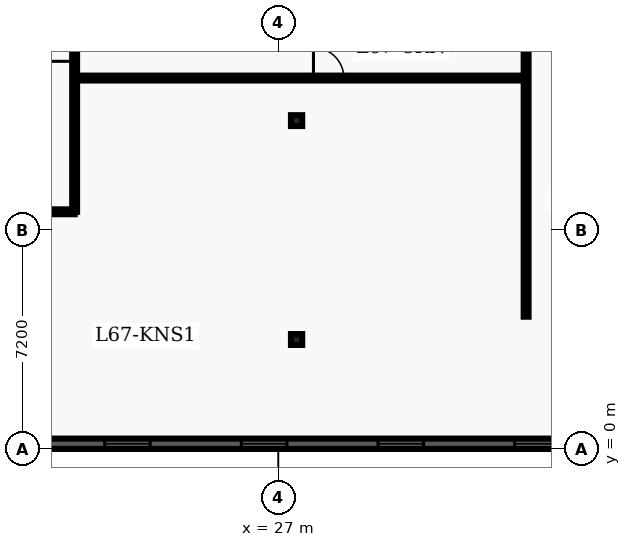
"""IFC4 building model, lengths in metres.
Left out: names, types, materials, properties, quantities, classifications, styles, units other than length and angle.
Written with IfcOpenShell. Run it as: python <this file> out.ifc"""

import sys

from ifc_helpers import new_model, entity, si_unit, converted_unit, direction, frame, origin_with_axes, origin_2d_with_axis, place, context, subcontext, project, spatial, polyline, rectangle, i_section, outline, extrude, element, fill, save


model = new_model("IFC4")
c1 = context("Model", 3, precision=1e-05, world=origin_with_axes(), true_north=direction((0.0, 1.0)))
c2 = subcontext(c1, "Body", "Model", "MODEL_VIEW")
j1 = project(units=[si_unit("LENGTHUNIT", "METRE"), converted_unit("PLANEANGLEUNIT", "DEGREE", entity("IfcPlaneAngleMeasure", 0.017), si_unit("PLANEANGLEUNIT", "RADIAN"), dimensions=[0, 0, 0, 0, 0, 0, 0])], contexts=[c1])
p1 = place(None, origin_with_axes())
s1 = spatial("IfcSite", under=j1, at=p1, CompositionType="ELEMENT")
p2 = place(p1, origin_with_axes())
s2 = spatial("IfcBuilding", under=s1, at=p2, CompositionType="ELEMENT")
p3 = place(p2, frame((0.0, 0.0, 272.4), z_axis=(0.0, 0.0, 1.0), x_axis=(1.0, 0.0, 0.0)))
s3 = spatial("IfcBuildingStorey", under=s2, at=p3, CompositionType="ELEMENT", Elevation=272.4)
for number, where, z_axis, x_axis in (
    (1, (27.6, 3.6, 0.0), (0.0, 0.0, 1.0), (1.0, 0.0, 0.0)),
    (2, (27.6, 10.8, 0.0), (0.0, 0.0, 1.0), (1.0, 0.0, 0.0)),
):
    element("IfcColumn", number, at=place(p3, frame(where, z_axis=z_axis, x_axis=x_axis)), inside=s3, PredefinedType="COLUMN", context=c2, shape_type="SweptSolid", body=[
        extrude(i_section(OverallWidth=0.369, OverallDepth=0.356, WebThickness=0.011, FlangeThickness=0.018, FilletRadius=0.018, at=origin_2d_with_axis()), origin_with_axes(), (0.0, 0.0, 1.0), 3.9),
    ])
p4 = place(p3, frame((8.135, 7.8, 0.0), z_axis=(0.0, 0.0, 1.0), x_axis=(1.0, 0.0, 0.0)))
e3 = element("IfcWall", 3, at=p4, inside=s3, PredefinedType="PARTITIONING", context=c2, shape_type="SweptSolid", body=[
    extrude(outline(polyline([(0.0, -0.08), (12.165, -0.08), (12.165, 0.08), (0.0, 0.08), (0.0, -0.08)])), origin_with_axes(), (0.0, 0.0, 1.0), 2.7),
])
p5 = place(p4, frame((3.994, 0.0, 0.0), z_axis=(0.0, 0.0, 1.0), x_axis=(1.0, 0.0, 0.0)))
e4 = element("IfcOpeningElement", 4, at=p5, cuts=e3, PredefinedType="OPENING", context=c2, shape_type="SweptSolid", body=[
    extrude(rectangle(XDim=1.0, YDim=0.18, at=origin_2d_with_axis()), origin_with_axes(), (0.0, 0.0, 1.0), 2.15),
])
p6 = place(p4, frame((8.794, 0.0, 0.0), z_axis=(0.0, 0.0, 1.0), x_axis=(1.0, 0.0, 0.0)))
e5 = element("IfcOpeningElement", 5, at=p6, cuts=e3, PredefinedType="OPENING", context=c2, shape_type="SweptSolid", body=[
    extrude(rectangle(XDim=1.0, YDim=0.18, at=origin_2d_with_axis()), origin_with_axes(), (0.0, 0.0, 1.0), 2.15),
])
p7 = place(p3, frame((20.3, 7.8, 0.0), z_axis=(0.0, 0.0, 1.0), x_axis=(0.0, 1.0, 0.0)))
e6 = element("IfcWall", 6, at=p7, inside=s3, PredefinedType="PARTITIONING", context=c2, shape_type="SweptSolid", body=[
    extrude(outline(polyline([(0.0, -0.08), (32.7, -0.08), (32.7, 0.08), (0.0, 0.08), (0.0, -0.08)])), origin_with_axes(), (0.0, 0.0, 1.0), 2.7),
])
p8 = place(p7, frame((14.2, 0.0, 0.0), z_axis=(0.0, 0.0, 1.0), x_axis=(1.0, 0.0, 0.0)))
e7 = element("IfcOpeningElement", 7, at=p8, cuts=e6, PredefinedType="OPENING", context=c2, shape_type="SweptSolid", body=[
    extrude(rectangle(XDim=1.0, YDim=0.18, at=origin_2d_with_axis()), origin_with_axes(), (0.0, 0.0, 1.0), 2.15),
])
p9 = place(p7, frame((18.779, 0.0, 0.0), z_axis=(0.0, 0.0, 1.0), x_axis=(1.0, 0.0, 0.0)))
e8 = element("IfcOpeningElement", 8, at=p9, cuts=e6, PredefinedType="OPENING", context=c2, shape_type="SweptSolid", body=[
    extrude(rectangle(XDim=1.0, YDim=0.18, at=origin_2d_with_axis()), origin_with_axes(), (0.0, 0.0, 1.0), 2.15),
])
p10 = place(p7, frame((23.784, 0.0, 0.0), z_axis=(0.0, 0.0, 1.0), x_axis=(1.0, 0.0, 0.0)))
e9 = element("IfcOpeningElement", 9, at=p10, cuts=e6, PredefinedType="OPENING", context=c2, shape_type="SweptSolid", body=[
    extrude(rectangle(XDim=1.0, YDim=0.18, at=origin_2d_with_axis()), origin_with_axes(), (0.0, 0.0, 1.0), 2.15),
])
p11 = place(p7, frame((27.651, 0.0, 0.0), z_axis=(0.0, 0.0, 1.0), x_axis=(1.0, 0.0, 0.0)))
e10 = element("IfcOpeningElement", 10, at=p11, cuts=e6, PredefinedType="OPENING", context=c2, shape_type="SweptSolid", body=[
    extrude(rectangle(XDim=1.0, YDim=0.18, at=origin_2d_with_axis()), origin_with_axes(), (0.0, 0.0, 1.0), 2.15),
])
p12 = place(p7, frame((5.475, 0.0, 0.0), z_axis=(0.0, 0.0, 1.0), x_axis=(1.0, 0.0, 0.0)))
e11 = element("IfcOpeningElement", 11, at=p12, cuts=e6, PredefinedType="OPENING", context=c2, shape_type="SweptSolid", body=[
    extrude(rectangle(XDim=1.05, YDim=0.18, at=origin_2d_with_axis()), origin_with_axes(), (0.0, 0.0, 1.0), 2.15),
])
p13 = place(p3, frame((20.3, 12.2, 0.0), z_axis=(0.0, 0.0, 1.0), x_axis=(1.0, 0.0, 0.0)))
e12 = element("IfcWall", 12, at=p13, inside=s3, PredefinedType="PARTITIONING", context=c2, shape_type="SweptSolid", body=[
    extrude(outline(polyline([(0.0, -0.08), (14.85, -0.08), (14.85, 0.08), (0.0, 0.08), (0.0, -0.08)])), origin_with_axes(), (0.0, 0.0, 1.0), 2.7),
])
p14 = place(p13, frame((8.355, 0.0, 0.0), z_axis=(0.0, 0.0, 1.0), x_axis=(1.0, 0.0, 0.0)))
e13 = element("IfcOpeningElement", 13, at=p14, cuts=e12, PredefinedType="OPENING", context=c2, shape_type="SweptSolid", body=[
    extrude(rectangle(XDim=1.0, YDim=0.18, at=origin_2d_with_axis()), origin_with_axes(), (0.0, 0.0, 1.0), 2.15),
])
p15 = place(p3, frame((35.15, 4.35, 0.0), z_axis=(0.0, 0.0, 1.0), x_axis=(0.0, 1.0, 0.0)))
e14 = element("IfcWall", 14, at=p15, inside=s3, PredefinedType="PARTITIONING", context=c2, shape_type="SweptSolid", body=[
    extrude(outline(polyline([(0.0, -0.08), (16.95, -0.08), (16.95, 0.08), (0.0, 0.08), (0.0, -0.08)])), origin_with_axes(), (0.0, 0.0, 1.0), 2.7),
])
p16 = place(p3, frame((47.36, 0.17, 0.0), z_axis=(0.0, 0.0, 1.0), x_axis=(-1.0, 0.0, 0.0)))
e15 = element("IfcWall", 15, at=p16, inside=s3, PredefinedType="SOLIDWALL", context=c2, shape_type="SweptSolid", body=[
    extrude(outline(polyline([(0.0, -0.17), (37.16, -0.17), (37.16, 0.17), (0.0, 0.17), (0.0, -0.17)])), origin_with_axes(), (0.0, 0.0, 1.0), 3.66),
])
p17 = place(p16, frame((2.847, 0.0, 0.45), z_axis=(0.0, 0.0, 1.0), x_axis=(1.0, 0.0, 0.0)))
e16 = element("IfcOpeningElement", 16, at=p17, cuts=e15, PredefinedType="OPENING", context=c2, shape_type="SweptSolid", body=[
    extrude(rectangle(XDim=1.5, YDim=0.36, at=origin_2d_with_axis()), origin_with_axes(), (0.0, 0.0, 1.0), 2.1),
])
p18 = place(p16, frame((7.342, 0.0, 0.45), z_axis=(0.0, 0.0, 1.0), x_axis=(1.0, 0.0, 0.0)))
e17 = element("IfcOpeningElement", 17, at=p18, cuts=e15, PredefinedType="OPENING", context=c2, shape_type="SweptSolid", body=[
    extrude(rectangle(XDim=1.5, YDim=0.36, at=origin_2d_with_axis()), origin_with_axes(), (0.0, 0.0, 1.0), 2.1),
])
p19 = place(p16, frame((11.837, 0.0, 0.45), z_axis=(0.0, 0.0, 1.0), x_axis=(1.0, 0.0, 0.0)))
e18 = element("IfcOpeningElement", 18, at=p19, cuts=e15, PredefinedType="OPENING", context=c2, shape_type="SweptSolid", body=[
    extrude(rectangle(XDim=1.5, YDim=0.36, at=origin_2d_with_axis()), origin_with_axes(), (0.0, 0.0, 1.0), 2.1),
])
p20 = place(p16, frame((16.332, 0.0, 0.45), z_axis=(0.0, 0.0, 1.0), x_axis=(1.0, 0.0, 0.0)))
e19 = element("IfcOpeningElement", 19, at=p20, cuts=e15, PredefinedType="OPENING", context=c2, shape_type="SweptSolid", body=[
    extrude(rectangle(XDim=1.5, YDim=0.36, at=origin_2d_with_axis()), origin_with_axes(), (0.0, 0.0, 1.0), 2.1),
])
p21 = place(p16, frame((20.827, 0.0, 0.45), z_axis=(0.0, 0.0, 1.0), x_axis=(1.0, 0.0, 0.0)))
e20 = element("IfcOpeningElement", 20, at=p21, cuts=e15, PredefinedType="OPENING", context=c2, shape_type="SweptSolid", body=[
    extrude(rectangle(XDim=1.5, YDim=0.36, at=origin_2d_with_axis()), origin_with_axes(), (0.0, 0.0, 1.0), 2.1),
])
p22 = place(p16, frame((25.322, 0.0, 0.45), z_axis=(0.0, 0.0, 1.0), x_axis=(1.0, 0.0, 0.0)))
e21 = element("IfcOpeningElement", 21, at=p22, cuts=e15, PredefinedType="OPENING", context=c2, shape_type="SweptSolid", body=[
    extrude(rectangle(XDim=1.5, YDim=0.36, at=origin_2d_with_axis()), origin_with_axes(), (0.0, 0.0, 1.0), 2.1),
])
p23 = place(p16, frame((29.817, 0.0, 0.45), z_axis=(0.0, 0.0, 1.0), x_axis=(1.0, 0.0, 0.0)))
e22 = element("IfcOpeningElement", 22, at=p23, cuts=e15, PredefinedType="OPENING", context=c2, shape_type="SweptSolid", body=[
    extrude(rectangle(XDim=1.5, YDim=0.36, at=origin_2d_with_axis()), origin_with_axes(), (0.0, 0.0, 1.0), 2.1),
])
p24 = place(p16, frame((34.312, 0.0, 0.45), z_axis=(0.0, 0.0, 1.0), x_axis=(1.0, 0.0, 0.0)))
e23 = element("IfcOpeningElement", 23, at=p24, cuts=e15, PredefinedType="OPENING", context=c2, shape_type="SweptSolid", body=[
    extrude(rectangle(XDim=1.5, YDim=0.36, at=origin_2d_with_axis()), origin_with_axes(), (0.0, 0.0, 1.0), 2.1),
])
p25 = place(p7, frame((5.475, 0.0, 0.0), z_axis=(0.0, 0.0, 1.0), x_axis=(1.0, 0.0, 0.0)))
e24 = element("IfcDoor", 24, at=p25, inside=s3, OperationType="SINGLE_SWING_LEFT", PredefinedType="DOOR", context=c2, shape_type="SweptSolid", body=[
    extrude(rectangle(XDim=1.05, YDim=0.09, at=origin_2d_with_axis()), origin_with_axes(), (0.0, 0.0, 1.0), 2.15),
])
fill(e11, e24)
p26 = place(p13, frame((8.355, 0.0, 0.0), z_axis=(0.0, 0.0, 1.0), x_axis=(1.0, 0.0, 0.0)))
e25 = element("IfcDoor", 25, at=p26, inside=s3, OperationType="SINGLE_SWING_LEFT", PredefinedType="DOOR", context=c2, shape_type="SweptSolid", body=[
    extrude(rectangle(XDim=1.0, YDim=0.09, at=origin_2d_with_axis()), origin_with_axes(), (0.0, 0.0, 1.0), 2.15),
])
fill(e13, e25)
p27 = place(p16, frame((11.837, 0.0, 0.45), z_axis=(0.0, 0.0, 1.0), x_axis=(1.0, 0.0, 0.0)))
e26 = element("IfcWindow", 26, at=p27, inside=s3, PredefinedType="WINDOW", context=c2, shape_type="SweptSolid", body=[
    extrude(rectangle(XDim=1.5, YDim=0.09, at=origin_2d_with_axis()), origin_with_axes(), (0.0, 0.0, 1.0), 2.1),
])
fill(e18, e26)
p28 = place(p16, frame((16.332, 0.0, 0.45), z_axis=(0.0, 0.0, 1.0), x_axis=(1.0, 0.0, 0.0)))
e27 = element("IfcWindow", 27, at=p28, inside=s3, PredefinedType="WINDOW", context=c2, shape_type="SweptSolid", body=[
    extrude(rectangle(XDim=1.5, YDim=0.09, at=origin_2d_with_axis()), origin_with_axes(), (0.0, 0.0, 1.0), 2.1),
])
fill(e19, e27)
p29 = place(p16, frame((20.827, 0.0, 0.45), z_axis=(0.0, 0.0, 1.0), x_axis=(1.0, 0.0, 0.0)))
e28 = element("IfcWindow", 28, at=p29, inside=s3, PredefinedType="WINDOW", context=c2, shape_type="SweptSolid", body=[
    extrude(rectangle(XDim=1.5, YDim=0.09, at=origin_2d_with_axis()), origin_with_axes(), (0.0, 0.0, 1.0), 2.1),
])
fill(e20, e28)
p30 = place(p16, frame((25.322, 0.0, 0.45), z_axis=(0.0, 0.0, 1.0), x_axis=(1.0, 0.0, 0.0)))
e29 = element("IfcWindow", 29, at=p30, inside=s3, PredefinedType="WINDOW", context=c2, shape_type="SweptSolid", body=[
    extrude(rectangle(XDim=1.5, YDim=0.09, at=origin_2d_with_axis()), origin_with_axes(), (0.0, 0.0, 1.0), 2.1),
])
fill(e21, e29)
save(model, sys.argv[1])
